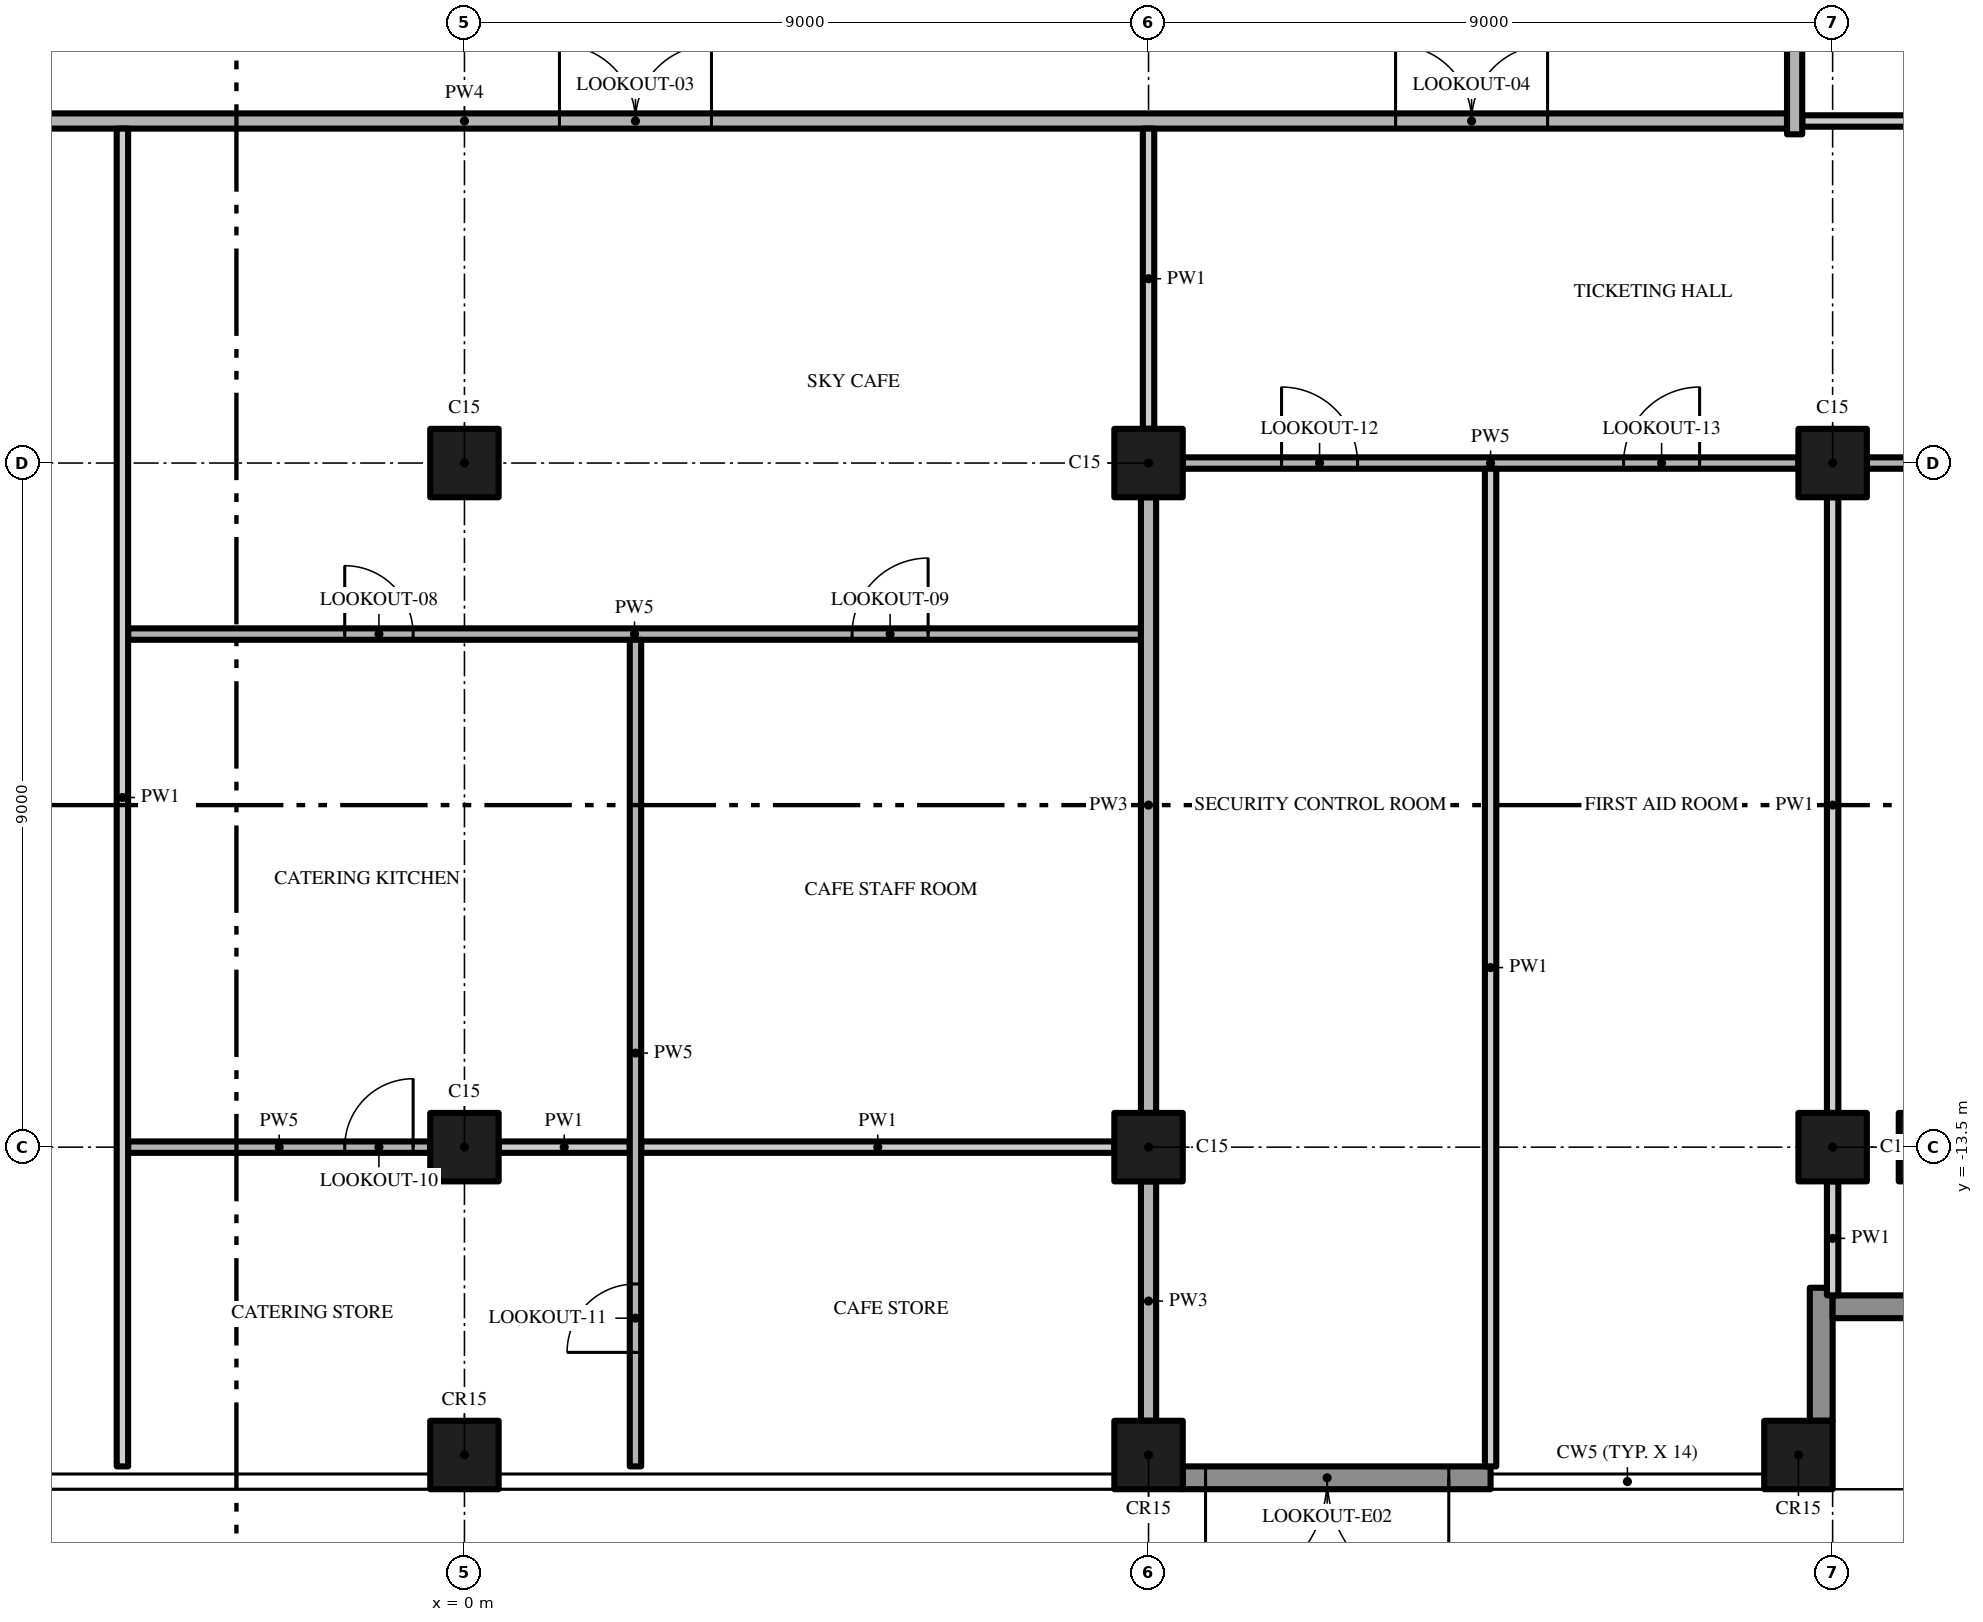
"""IFC4 building model, lengths in metres.
Left out: names, types, materials, properties, quantities, classifications, styles, units other than length and angle.
Written with IfcOpenShell. Run it as: python <this file> out.ifc"""

import sys

from ifc_helpers import new_model, si_unit, direction, frame, frame_2d, origin, origin_2d, place, context, subcontext, project, spatial, rectangle, extrude, element, fill, save


model = new_model("IFC4")
c1 = context("Model", 3, precision=1e-05, world=origin(), true_north=direction((0.0, 1.0)))
c2 = subcontext(c1, "Body", "Model", "MODEL_VIEW")
j1 = project(units=[si_unit("LENGTHUNIT", "METRE"), si_unit("PLANEANGLEUNIT", "RADIAN")], contexts=[c1])
p1 = place(None, origin())
s1 = spatial("IfcSite", under=j1, at=p1, CompositionType="ELEMENT")
p2 = place(p1, origin())
s2 = spatial("IfcBuilding", under=s1, at=p2, CompositionType="ELEMENT")
p3 = place(p2, frame((0.0, 0.0, 297.4)))
s3 = spatial("IfcBuildingStorey", under=s2, at=p3, CompositionType="ELEMENT", Elevation=297.4)
for number, where, z_axis, x_axis in (
    (1, (0.0, -13.5, 0.0), (0.0, 0.0, 1.0), (1.0, 0.0, 0.0)),
    (2, (0.0, -17.55, 0.0), (0.0, 0.0, 1.0), (1.0, 0.0, 0.0)),
    (3, (0.0, -4.5, 0.0), (0.0, 0.0, 1.0), (1.0, 0.0, 0.0)),
    (4, (18.0, -13.5, 0.0), (0.0, 0.0, 1.0), (1.0, 0.0, 0.0)),
    (5, (17.55, -17.55, 0.0), (0.0, 0.0, 1.0), (1.0, 0.0, 0.0)),
    (6, (18.0, -4.5, 0.0), (0.0, 0.0, 1.0), (1.0, 0.0, 0.0)),
    (7, (19.32, -13.5, 0.0), (0.0, 0.0, 1.0), (1.0, 0.0, 0.0)),
    (8, (9.0, -13.5, 0.0), (0.0, 0.0, 1.0), (1.0, 0.0, 0.0)),
    (9, (9.0, -17.55, 0.0), (0.0, 0.0, 1.0), (1.0, 0.0, 0.0)),
    (10, (9.0, -4.5, 0.0), (0.0, 0.0, 1.0), (1.0, 0.0, 0.0)),
):
    element("IfcColumn", number, at=place(p3, frame(where, z_axis=z_axis, x_axis=x_axis)), inside=s3, PredefinedType="COLUMN", context=c2, shape_type="SweptSolid", body=[
        extrude(rectangle(XDim=0.9, YDim=0.9, at=origin_2d()), origin(), (0.0, 0.0, 1.0), 5.65),
    ])
p4 = place(p3, frame((13.5, -17.85, 0.0), z_axis=(0.0, 0.0, 1.0), x_axis=(-1.0, 0.0, 0.0)))
e11 = element("IfcWall", 11, at=p4, inside=s3, PredefinedType="SOLIDWALL", context=c2, shape_type="SweptSolid", body=[
    extrude(rectangle(XDim=4.05, YDim=0.3, at=frame_2d((2.025, 0.0))), origin(), (0.0, 0.0, 1.0), 5.65),
])
p5 = place(p4, frame((0.55, 0.0, 0.0)))
e12 = element("IfcOpeningElement", 12, at=p5, cuts=e11, PredefinedType="OPENING", context=c2, shape_type="SweptSolid", body=[
    extrude(rectangle(XDim=3.2, YDim=2.4, at=frame_2d((1.6, 1.2))), frame((0.0, 0.16, 0.0), z_axis=(0.0, -1.0, 0.0), x_axis=(1.0, 0.0, 0.0)), (0.0, 0.0, 1.0), 0.32),
])
p6 = place(p3, frame((17.85, -15.35, 0.0), z_axis=(0.0, 0.0, 1.0), x_axis=(0.0, -1.0, 0.0)))
e13 = element("IfcWall", 13, at=p6, inside=s3, PredefinedType="SOLIDWALL", context=c2, shape_type="SweptSolid", body=[
    extrude(rectangle(XDim=1.75, YDim=0.3, at=frame_2d((0.875, 0.0))), origin(), (0.0, 0.0, 1.0), 5.65),
])
p7 = place(p3, frame((20.25, -15.6, 0.0), z_axis=(0.0, 0.0, 1.0), x_axis=(-1.0, 0.0, 0.0)))
e14 = element("IfcWall", 14, at=p7, inside=s3, PredefinedType="SOLIDWALL", context=c2, shape_type="SweptSolid", body=[
    extrude(rectangle(XDim=2.25, YDim=0.3, at=frame_2d((1.125, 0.0))), origin(), (0.0, 0.0, 1.0), 5.65),
])
p8 = place(p3, frame((-4.425, -13.5, 0.0), z_axis=(0.0, 0.0, 1.0), x_axis=(1.0, 0.0, 0.0)))
e15 = element("IfcWall", 15, at=p8, inside=s3, PredefinedType="PARTITIONING", context=c2, shape_type="SweptSolid", body=[
    extrude(rectangle(XDim=3.975, YDim=0.15, at=frame_2d((1.988, 0.0))), origin(), (0.0, 0.0, 1.0), 5.65),
])
p9 = place(p8, frame((2.85, 0.0, 0.0)))
e16 = element("IfcOpeningElement", 16, at=p9, cuts=e15, PredefinedType="OPENING", context=c2, shape_type="SweptSolid", body=[
    extrude(rectangle(XDim=0.9, YDim=2.1, at=frame_2d((0.45, 1.05))), frame((0.0, 0.085, 0.0), z_axis=(0.0, -1.0, 0.0), x_axis=(1.0, 0.0, 0.0)), (0.0, 0.0, 1.0), 0.17),
])
p10 = place(p3, frame((0.45, -13.5, 0.0), z_axis=(0.0, 0.0, 1.0), x_axis=(1.0, 0.0, 0.0)))
e17 = element("IfcWall", 17, at=p10, inside=s3, PredefinedType="PARTITIONING", context=c2, shape_type="SweptSolid", body=[
    extrude(rectangle(XDim=1.725, YDim=0.15, at=frame_2d((0.863, 0.0))), origin(), (0.0, 0.0, 1.0), 5.65),
])
p11 = place(p3, frame((2.325, -13.5, 0.0), z_axis=(0.0, 0.0, 1.0), x_axis=(1.0, 0.0, 0.0)))
e18 = element("IfcWall", 18, at=p11, inside=s3, PredefinedType="PARTITIONING", context=c2, shape_type="SweptSolid", body=[
    extrude(rectangle(XDim=6.225, YDim=0.15, at=frame_2d((3.112, 0.0))), origin(), (0.0, 0.0, 1.0), 5.65),
])
p12 = place(p3, frame((-4.425, -6.75, 0.0), z_axis=(0.0, 0.0, 1.0), x_axis=(1.0, 0.0, 0.0)))
e19 = element("IfcWall", 19, at=p12, inside=s3, PredefinedType="PARTITIONING", context=c2, shape_type="SweptSolid", body=[
    extrude(rectangle(XDim=13.325, YDim=0.15, at=frame_2d((6.662, 0.0))), origin(), (0.0, 0.0, 1.0), 5.65),
])
p13 = place(p12, frame((2.85, 0.0, 0.0)))
e20 = element("IfcOpeningElement", 20, at=p13, cuts=e19, PredefinedType="OPENING", context=c2, shape_type="SweptSolid", body=[
    extrude(rectangle(XDim=0.9, YDim=2.1, at=frame_2d((0.45, 1.05))), frame((0.0, 0.085, 0.0), z_axis=(0.0, -1.0, 0.0), x_axis=(1.0, 0.0, 0.0)), (0.0, 0.0, 1.0), 0.17),
])
p14 = place(p12, frame((9.525, 0.0, 0.0)))
e21 = element("IfcOpeningElement", 21, at=p14, cuts=e19, PredefinedType="OPENING", context=c2, shape_type="SweptSolid", body=[
    extrude(rectangle(XDim=1.0, YDim=2.4, at=frame_2d((0.5, 1.2))), frame((0.0, 0.085, 0.0), z_axis=(0.0, -1.0, 0.0), x_axis=(1.0, 0.0, 0.0)), (0.0, 0.0, 1.0), 0.17),
])
p15 = place(p3, frame((9.45, -4.5, 0.0), z_axis=(0.0, 0.0, 1.0), x_axis=(1.0, 0.0, 0.0)))
e22 = element("IfcWall", 22, at=p15, inside=s3, PredefinedType="PARTITIONING", context=c2, shape_type="SweptSolid", body=[
    extrude(rectangle(XDim=8.1, YDim=0.15, at=frame_2d((4.05, 0.0))), origin(), (0.0, 0.0, 1.0), 5.65),
])
p16 = place(p15, frame((1.3, 0.0, 0.0)))
e23 = element("IfcOpeningElement", 23, at=p16, cuts=e22, PredefinedType="OPENING", context=c2, shape_type="SweptSolid", body=[
    extrude(rectangle(XDim=1.0, YDim=2.4, at=frame_2d((0.5, 1.2))), frame((0.0, 0.085, 0.0), z_axis=(0.0, -1.0, 0.0), x_axis=(1.0, 0.0, 0.0)), (0.0, 0.0, 1.0), 0.17),
])
p17 = place(p15, frame((5.8, 0.0, 0.0)))
e24 = element("IfcOpeningElement", 24, at=p17, cuts=e22, PredefinedType="OPENING", context=c2, shape_type="SweptSolid", body=[
    extrude(rectangle(XDim=1.0, YDim=2.4, at=frame_2d((0.5, 1.2))), frame((0.0, 0.085, 0.0), z_axis=(0.0, -1.0, 0.0), x_axis=(1.0, 0.0, 0.0)), (0.0, 0.0, 1.0), 0.17),
])
p18 = place(p3, frame((18.45, -4.5, 0.0), z_axis=(0.0, 0.0, 1.0), x_axis=(1.0, 0.0, 0.0)))
e25 = element("IfcWall", 25, at=p18, inside=s3, PredefinedType="PARTITIONING", context=c2, shape_type="SweptSolid", body=[
    extrude(rectangle(XDim=3.15, YDim=0.15, at=frame_2d((1.575, 0.0))), origin(), (0.0, 0.0, 1.0), 5.65),
])
p19 = place(p18, frame((1.35, 0.0, 0.0)))
e26 = element("IfcOpeningElement", 26, at=p19, cuts=e25, PredefinedType="OPENING", context=c2, shape_type="SweptSolid", body=[
    extrude(rectangle(XDim=0.9, YDim=2.1, at=frame_2d((0.45, 1.05))), frame((0.0, 0.085, 0.0), z_axis=(0.0, -1.0, 0.0), x_axis=(1.0, 0.0, 0.0)), (0.0, 0.0, 1.0), 0.17),
])
p20 = place(p3, frame((-17.4, 0.0, 0.0), z_axis=(0.0, 0.0, 1.0), x_axis=(1.0, 0.0, 0.0)))
e27 = element("IfcWall", 27, at=p20, inside=s3, PredefinedType="PARTITIONING", context=c2, shape_type="SweptSolid", body=[
    extrude(rectangle(XDim=34.8, YDim=0.2, at=frame_2d((17.4, 0.0))), origin(), (0.0, 0.0, 1.0), 5.65),
])
p21 = place(p20, frame((0.9, 0.0, 0.0)))
e28 = element("IfcOpeningElement", 28, at=p21, cuts=e27, PredefinedType="OPENING", context=c2, shape_type="SweptSolid", body=[
    extrude(rectangle(XDim=2.0, YDim=2.4, at=frame_2d((1.0, 1.2))), frame((0.0, 0.11, 0.0), z_axis=(0.0, -1.0, 0.0), x_axis=(1.0, 0.0, 0.0)), (0.0, 0.0, 1.0), 0.22),
])
p22 = place(p20, frame((7.4, 0.0, 0.0)))
e29 = element("IfcOpeningElement", 29, at=p22, cuts=e27, PredefinedType="OPENING", context=c2, shape_type="SweptSolid", body=[
    extrude(rectangle(XDim=2.0, YDim=2.4, at=frame_2d((1.0, 1.2))), frame((0.0, 0.11, 0.0), z_axis=(0.0, -1.0, 0.0), x_axis=(1.0, 0.0, 0.0)), (0.0, 0.0, 1.0), 0.22),
])
p23 = place(p20, frame((18.65, 0.0, 0.0)))
e30 = element("IfcOpeningElement", 30, at=p23, cuts=e27, PredefinedType="OPENING", context=c2, shape_type="SweptSolid", body=[
    extrude(rectangle(XDim=2.0, YDim=2.4, at=frame_2d((1.0, 1.2))), frame((0.0, 0.11, 0.0), z_axis=(0.0, -1.0, 0.0), x_axis=(1.0, 0.0, 0.0)), (0.0, 0.0, 1.0), 0.22),
])
p24 = place(p20, frame((29.65, 0.0, 0.0)))
e31 = element("IfcOpeningElement", 31, at=p24, cuts=e27, PredefinedType="OPENING", context=c2, shape_type="SweptSolid", body=[
    extrude(rectangle(XDim=2.0, YDim=2.4, at=frame_2d((1.0, 1.2))), frame((0.0, 0.11, 0.0), z_axis=(0.0, -1.0, 0.0), x_axis=(1.0, 0.0, 0.0)), (0.0, 0.0, 1.0), 0.22),
])
p25 = place(p3, frame((17.6, 0.0, 0.0), z_axis=(0.0, 0.0, 1.0), x_axis=(1.0, 0.0, 0.0)))
e32 = element("IfcWall", 32, at=p25, inside=s3, PredefinedType="PARTITIONING", context=c2, shape_type="SweptSolid", body=[
    extrude(rectangle(XDim=4.6, YDim=0.15, at=frame_2d((2.3, 0.0))), origin(), (0.0, 0.0, 1.0), 5.65),
])
p26 = place(p3, frame((-4.5, -17.7, 0.0), z_axis=(0.0, 0.0, 1.0), x_axis=(0.0, 1.0, 0.0)))
e33 = element("IfcWall", 33, at=p26, inside=s3, PredefinedType="PARTITIONING", context=c2, shape_type="SweptSolid", body=[
    extrude(rectangle(XDim=17.6, YDim=0.15, at=frame_2d((8.8, 0.0))), origin(), (0.0, 0.0, 1.0), 5.65),
])
p27 = place(p3, frame((2.25, -17.7, 0.0), z_axis=(0.0, 0.0, 1.0), x_axis=(0.0, 1.0, 0.0)))
e34 = element("IfcWall", 34, at=p27, inside=s3, PredefinedType="PARTITIONING", context=c2, shape_type="SweptSolid", body=[
    extrude(rectangle(XDim=10.875, YDim=0.15, at=frame_2d((5.438, 0.0))), origin(), (0.0, 0.0, 1.0), 5.65),
])
p28 = place(p27, frame((1.5, 0.0, 0.0)))
e35 = element("IfcOpeningElement", 35, at=p28, cuts=e34, PredefinedType="OPENING", context=c2, shape_type="SweptSolid", body=[
    extrude(rectangle(XDim=0.9, YDim=2.1, at=frame_2d((0.45, 1.05))), frame((0.0, 0.085, 0.0), z_axis=(0.0, -1.0, 0.0), x_axis=(1.0, 0.0, 0.0)), (0.0, 0.0, 1.0), 0.17),
])
p29 = place(p3, frame((9.0, -4.05, 0.0), z_axis=(0.0, 0.0, 1.0), x_axis=(0.0, 1.0, 0.0)))
e36 = element("IfcWall", 36, at=p29, inside=s3, PredefinedType="PARTITIONING", context=c2, shape_type="SweptSolid", body=[
    extrude(rectangle(XDim=3.95, YDim=0.15, at=frame_2d((1.975, 0.0))), origin(), (0.0, 0.0, 1.0), 5.65),
])
p30 = place(p3, frame((9.0, -17.1, 0.0), z_axis=(0.0, 0.0, 1.0), x_axis=(0.0, 1.0, 0.0)))
e37 = element("IfcWall", 37, at=p30, inside=s3, PredefinedType="PARTITIONING", context=c2, shape_type="SweptSolid", body=[
    extrude(rectangle(XDim=3.15, YDim=0.2, at=frame_2d((1.575, 0.0))), origin(), (0.0, 0.0, 1.0), 5.65),
])
p31 = place(p3, frame((9.0, -13.05, 0.0), z_axis=(0.0, 0.0, 1.0), x_axis=(0.0, 1.0, 0.0)))
e38 = element("IfcWall", 38, at=p31, inside=s3, PredefinedType="PARTITIONING", context=c2, shape_type="SweptSolid", body=[
    extrude(rectangle(XDim=8.1, YDim=0.2, at=frame_2d((4.05, 0.0))), origin(), (0.0, 0.0, 1.0), 5.65),
])
p32 = place(p3, frame((13.5, -17.7, 0.0), z_axis=(0.0, 0.0, 1.0), x_axis=(0.0, 1.0, 0.0)))
e39 = element("IfcWall", 39, at=p32, inside=s3, PredefinedType="PARTITIONING", context=c2, shape_type="SweptSolid", body=[
    extrude(rectangle(XDim=13.125, YDim=0.15, at=frame_2d((6.562, 0.0))), origin(), (0.0, 0.0, 1.0), 5.65),
])
p33 = place(p3, frame((17.5, -0.175, 0.0), z_axis=(0.0, 0.0, 1.0), x_axis=(0.0, 1.0, 0.0)))
e40 = element("IfcWall", 40, at=p33, inside=s3, PredefinedType="PARTITIONING", context=c2, shape_type="SweptSolid", body=[
    extrude(rectangle(XDim=4.225, YDim=0.2, at=frame_2d((2.112, 0.0))), origin(), (0.0, 0.0, 1.0), 5.65),
])
p34 = place(p3, frame((18.0, -15.45, 0.0), z_axis=(0.0, 0.0, 1.0), x_axis=(0.0, 1.0, 0.0)))
e41 = element("IfcWall", 41, at=p34, inside=s3, PredefinedType="PARTITIONING", context=c2, shape_type="SweptSolid", body=[
    extrude(rectangle(XDim=1.5, YDim=0.15, at=frame_2d((0.75, 0.0))), origin(), (0.0, 0.0, 1.0), 5.65),
])
p35 = place(p3, frame((18.0, -13.05, 0.0), z_axis=(0.0, 0.0, 1.0), x_axis=(0.0, 1.0, 0.0)))
e42 = element("IfcWall", 42, at=p35, inside=s3, PredefinedType="PARTITIONING", context=c2, shape_type="SweptSolid", body=[
    extrude(rectangle(XDim=8.1, YDim=0.15, at=frame_2d((4.05, 0.0))), origin(), (0.0, 0.0, 1.0), 5.65),
])
p36 = place(p5, origin())
e43 = element("IfcDoor", 43, at=p36, inside=s3, OperationType="SINGLE_SWING_LEFT", PredefinedType="DOOR", context=c2, shape_type="SweptSolid", body=[
    extrude(rectangle(XDim=3.2, YDim=2.4, at=frame_2d((1.6, 1.2))), frame((0.0, 0.025, 0.0), z_axis=(0.0, -1.0, 0.0), x_axis=(1.0, 0.0, 0.0)), (0.0, 0.0, 1.0), 0.05),
])
fill(e12, e43)
p37 = place(p23, origin())
e44 = element("IfcDoor", 44, at=p37, inside=s3, OperationType="DOUBLE_DOOR_SINGLE_SWING", PredefinedType="DOOR", context=c2, shape_type="SweptSolid", body=[
    extrude(rectangle(XDim=2.0, YDim=2.4, at=frame_2d((1.0, 1.2))), frame((0.0, 0.025, 0.0), z_axis=(0.0, -1.0, 0.0), x_axis=(1.0, 0.0, 0.0)), (0.0, 0.0, 1.0), 0.05),
])
fill(e30, e44)
p38 = place(p24, origin())
e45 = element("IfcDoor", 45, at=p38, inside=s3, OperationType="DOUBLE_DOOR_SINGLE_SWING", PredefinedType="DOOR", context=c2, shape_type="SweptSolid", body=[
    extrude(rectangle(XDim=2.0, YDim=2.4, at=frame_2d((1.0, 1.2))), frame((0.0, 0.025, 0.0), z_axis=(0.0, -1.0, 0.0), x_axis=(1.0, 0.0, 0.0)), (0.0, 0.0, 1.0), 0.05),
])
fill(e31, e45)
p39 = place(p13, origin())
e46 = element("IfcDoor", 46, at=p39, inside=s3, OperationType="SINGLE_SWING_LEFT", PredefinedType="DOOR", context=c2, shape_type="SweptSolid", body=[
    extrude(rectangle(XDim=0.9, YDim=2.1, at=frame_2d((0.45, 1.05))), frame((0.0, 0.025, 0.0), z_axis=(0.0, -1.0, 0.0), x_axis=(1.0, 0.0, 0.0)), (0.0, 0.0, 1.0), 0.05),
])
fill(e20, e46)
p40 = place(p14, origin())
e47 = element("IfcDoor", 47, at=p40, inside=s3, OperationType="SINGLE_SWING_RIGHT", PredefinedType="DOOR", context=c2, shape_type="SweptSolid", body=[
    extrude(rectangle(XDim=1.0, YDim=2.4, at=frame_2d((0.5, 1.2))), frame((0.0, 0.025, 0.0), z_axis=(0.0, -1.0, 0.0), x_axis=(1.0, 0.0, 0.0)), (0.0, 0.0, 1.0), 0.05),
])
fill(e21, e47)
p41 = place(p9, origin())
e48 = element("IfcDoor", 48, at=p41, inside=s3, OperationType="SINGLE_SWING_RIGHT", PredefinedType="DOOR", context=c2, shape_type="SweptSolid", body=[
    extrude(rectangle(XDim=0.9, YDim=2.1, at=frame_2d((0.45, 1.05))), frame((0.0, 0.025, 0.0), z_axis=(0.0, -1.0, 0.0), x_axis=(1.0, 0.0, 0.0)), (0.0, 0.0, 1.0), 0.05),
])
fill(e16, e48)
p42 = place(p28, origin())
e49 = element("IfcDoor", 49, at=p42, inside=s3, OperationType="SINGLE_SWING_LEFT", PredefinedType="DOOR", context=c2, shape_type="SweptSolid", body=[
    extrude(rectangle(XDim=0.9, YDim=2.1, at=frame_2d((0.45, 1.05))), frame((0.0, 0.025, 0.0), z_axis=(0.0, -1.0, 0.0), x_axis=(1.0, 0.0, 0.0)), (0.0, 0.0, 1.0), 0.05),
])
fill(e35, e49)
p43 = place(p16, origin())
e50 = element("IfcDoor", 50, at=p43, inside=s3, OperationType="SINGLE_SWING_LEFT", PredefinedType="DOOR", context=c2, shape_type="SweptSolid", body=[
    extrude(rectangle(XDim=1.0, YDim=2.4, at=frame_2d((0.5, 1.2))), frame((0.0, 0.025, 0.0), z_axis=(0.0, -1.0, 0.0), x_axis=(1.0, 0.0, 0.0)), (0.0, 0.0, 1.0), 0.05),
])
fill(e23, e50)
p44 = place(p17, origin())
e51 = element("IfcDoor", 51, at=p44, inside=s3, OperationType="SINGLE_SWING_RIGHT", PredefinedType="DOOR", context=c2, shape_type="SweptSolid", body=[
    extrude(rectangle(XDim=1.0, YDim=2.4, at=frame_2d((0.5, 1.2))), frame((0.0, 0.025, 0.0), z_axis=(0.0, -1.0, 0.0), x_axis=(1.0, 0.0, 0.0)), (0.0, 0.0, 1.0), 0.05),
])
fill(e24, e51)
save(model, sys.argv[1])
